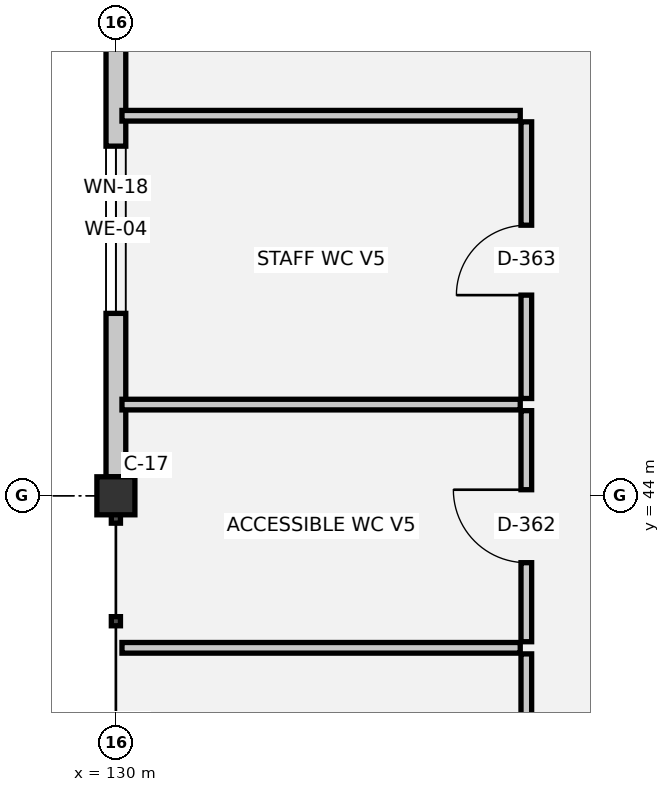
"""IFC4 building model, lengths in metres.
Left out: names, types, materials, properties, quantities, classifications, styles, units other than length and angle.
Written with IfcOpenShell. Run it as: python <this file> out.ifc"""

import sys

from ifc_helpers import new_model, si_unit, direction, frame, frame_2d, origin, origin_2d, place, context, subcontext, project, spatial, rectangle, extrude, element, fill, save


model = new_model("IFC4")
c1 = context("Model", 3, precision=1e-05, world=origin(), true_north=direction((0.0, 1.0)))
c2 = subcontext(c1, "Body", "Model", "MODEL_VIEW")
j1 = project(units=[si_unit("LENGTHUNIT", "METRE"), si_unit("PLANEANGLEUNIT", "RADIAN")], contexts=[c1])
p1 = place(None, origin())
s1 = spatial("IfcSite", under=j1, at=p1, CompositionType="ELEMENT")
p2 = place(p1, origin())
s2 = spatial("IfcBuilding", under=s1, at=p2, CompositionType="ELEMENT")
p3 = place(p2, frame((0.0, 0.0, 29.55)))
s3 = spatial("IfcBuildingStorey", under=s2, at=p3, CompositionType="ELEMENT", Elevation=29.55)
p4 = place(p3, frame((130.0, 44.0, 0.0), z_axis=(0.0, 0.0, 1.0), x_axis=(1.0, 0.0, 0.0)))
e1 = element("IfcColumn", 1, at=p4, inside=s3, PredefinedType="COLUMN", context=c2, shape_type="SweptSolid", body=[
    extrude(rectangle(XDim=0.5, YDim=0.5, at=origin_2d()), origin(), (0.0, 0.0, 1.0), 3.75),
])
p5 = place(p3, frame((130.0, 44.25, 0.0), z_axis=(0.0, 0.0, 1.0), x_axis=(0.0, 1.0, 0.0)))
e2 = element("IfcWall", 2, at=p5, inside=s3, PredefinedType="SOLIDWALL", context=c2, shape_type="SweptSolid", body=[
    extrude(rectangle(XDim=6.5, YDim=0.26, at=frame_2d((3.25, 0.0))), origin(), (0.0, 0.0, 1.0), 2.51),
])
p6 = place(p5, frame((2.15, 0.0, 0.9)))
e3 = element("IfcOpeningElement", 3, at=p6, cuts=e2, PredefinedType="OPENING", context=c2, shape_type="SweptSolid", body=[
    extrude(rectangle(XDim=2.2, YDim=1.0, at=frame_2d((1.1, 0.5))), frame((0.0, 0.14, 0.0), z_axis=(0.0, -1.0, 0.0), x_axis=(1.0, 0.0, 0.0)), (0.0, 0.0, 1.0), 0.28),
])
for number, where, z_axis, x_axis in (
    (4, (130.08, 42.0, 0.0), (0.0, 0.0, 1.0), (1.0, 0.0, 0.0)),
    (5, (130.08, 45.2, 0.0), (0.0, 0.0, 1.0), (1.0, 0.0, 0.0)),
    (6, (130.08, 49.0, 0.0), (0.0, 0.0, 1.0), (1.0, 0.0, 0.0)),
):
    element("IfcWall", number, at=place(p3, frame(where, z_axis=z_axis, x_axis=x_axis)), inside=s3, PredefinedType="PLUMBINGWALL", context=c2, shape_type="SweptSolid", body=[
        extrude(rectangle(XDim=5.24, YDim=0.14, at=frame_2d((2.62, 0.0))), origin(), (0.0, 0.0, 1.0), 3.39),
    ])
p7 = place(p3, frame((135.4, 38.08, 0.0), z_axis=(0.0, 0.0, 1.0), x_axis=(0.0, 1.0, 0.0)))
e7 = element("IfcWall", 7, at=p7, inside=s3, PredefinedType="PLUMBINGWALL", context=c2, shape_type="SweptSolid", body=[
    extrude(rectangle(XDim=3.84, YDim=0.14, at=frame_2d((1.92, 0.0))), origin(), (0.0, 0.0, 1.0), 3.39),
])
p8 = place(p7, frame((1.46, 0.0, 0.0)))
e8 = element("IfcOpeningElement", 8, at=p8, cuts=e7, PredefinedType="OPENING", context=c2, shape_type="SweptSolid", body=[
    extrude(rectangle(XDim=0.92, YDim=2.1, at=frame_2d((0.46, 1.05))), frame((0.0, 0.08, 0.0), z_axis=(0.0, -1.0, 0.0), x_axis=(1.0, 0.0, 0.0)), (0.0, 0.0, 1.0), 0.16),
])
p9 = place(p3, frame((135.4, 42.08, 0.0), z_axis=(0.0, 0.0, 1.0), x_axis=(0.0, 1.0, 0.0)))
e9 = element("IfcWall", 9, at=p9, inside=s3, PredefinedType="PLUMBINGWALL", context=c2, shape_type="SweptSolid", body=[
    extrude(rectangle(XDim=3.04, YDim=0.14, at=frame_2d((1.52, 0.0))), origin(), (0.0, 0.0, 1.0), 3.39),
])
p10 = place(p9, frame((1.04, 0.0, 0.0)))
e10 = element("IfcOpeningElement", 10, at=p10, cuts=e9, PredefinedType="OPENING", context=c2, shape_type="SweptSolid", body=[
    extrude(rectangle(XDim=0.96, YDim=2.1, at=frame_2d((0.48, 1.05))), frame((0.0, 0.08, 0.0), z_axis=(0.0, -1.0, 0.0), x_axis=(1.0, 0.0, 0.0)), (0.0, 0.0, 1.0), 0.16),
])
p11 = place(p3, frame((135.4, 45.28, 0.0), z_axis=(0.0, 0.0, 1.0), x_axis=(0.0, 1.0, 0.0)))
e11 = element("IfcWall", 11, at=p11, inside=s3, PredefinedType="PLUMBINGWALL", context=c2, shape_type="SweptSolid", body=[
    extrude(rectangle(XDim=3.64, YDim=0.14, at=frame_2d((1.82, 0.0))), origin(), (0.0, 0.0, 1.0), 3.39),
])
p12 = place(p11, frame((1.36, 0.0, 0.0)))
e12 = element("IfcOpeningElement", 12, at=p12, cuts=e11, PredefinedType="OPENING", context=c2, shape_type="SweptSolid", body=[
    extrude(rectangle(XDim=0.92, YDim=2.1, at=frame_2d((0.46, 1.05))), frame((0.0, 0.08, 0.0), z_axis=(0.0, -1.0, 0.0), x_axis=(1.0, 0.0, 0.0)), (0.0, 0.0, 1.0), 0.16),
])
p13 = place(p6, origin())
e13 = element("IfcWindow", 13, at=p13, inside=s3, PartitioningType="SINGLE_PANEL", PredefinedType="WINDOW", context=c2, shape_type="SweptSolid", body=[
    extrude(rectangle(XDim=2.2, YDim=1.0, at=frame_2d((1.1, 0.5))), frame((0.0, 0.03, 0.0), z_axis=(0.0, -1.0, 0.0), x_axis=(1.0, 0.0, 0.0)), (0.0, 0.0, 1.0), 0.06),
])
fill(e3, e13)
p14 = place(p10, origin())
e14 = element("IfcDoor", 14, at=p14, inside=s3, OperationType="SINGLE_SWING_RIGHT", PredefinedType="DOOR", context=c2, shape_type="SweptSolid", body=[
    extrude(rectangle(XDim=0.96, YDim=2.1, at=frame_2d((0.48, 1.05))), frame((0.0, 0.025, 0.0), z_axis=(0.0, -1.0, 0.0), x_axis=(1.0, 0.0, 0.0)), (0.0, 0.0, 1.0), 0.05),
])
fill(e10, e14)
p15 = place(p12, origin())
e15 = element("IfcDoor", 15, at=p15, inside=s3, OperationType="SINGLE_SWING_LEFT", PredefinedType="DOOR", context=c2, shape_type="SweptSolid", body=[
    extrude(rectangle(XDim=0.92, YDim=2.1, at=frame_2d((0.46, 1.05))), frame((0.0, 0.025, 0.0), z_axis=(0.0, -1.0, 0.0), x_axis=(1.0, 0.0, 0.0)), (0.0, 0.0, 1.0), 0.05),
])
fill(e12, e15)
save(model, sys.argv[1])
